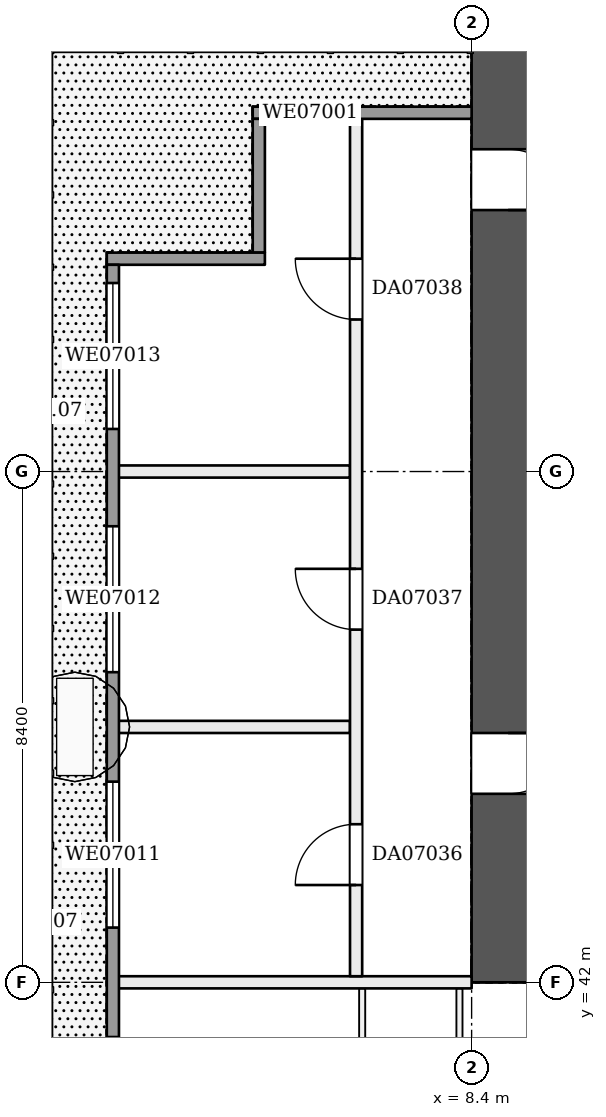
"""IFC4 building model, lengths in metres.
Left out: names, types, materials, properties, quantities, classifications, styles, units other than length and angle.
Written with IfcOpenShell. Run it as: python <this file> out.ifc"""

import sys

from ifc_helpers import new_model, si_unit, direction, frame, frame_2d, origin, place, context, subcontext, project, spatial, rectangle, extrude, element, fill, save


model = new_model("IFC4")
c1 = context("Model", 3, precision=1e-05, world=origin(), true_north=direction((0.0, 1.0)))
c2 = subcontext(c1, "Body", "Model", "MODEL_VIEW")
j1 = project(units=[si_unit("LENGTHUNIT", "METRE"), si_unit("PLANEANGLEUNIT", "RADIAN")], contexts=[c1])
p1 = place(None, origin())
s1 = spatial("IfcSite", under=j1, at=p1, CompositionType="ELEMENT")
p2 = place(p1, origin())
s2 = spatial("IfcBuilding", under=s1, at=p2, CompositionType="ELEMENT")
p3 = place(p2, frame((0.0, 0.0, 35.7)))
s3 = spatial("IfcBuildingStorey", under=s2, at=p3, CompositionType="ELEMENT", Elevation=35.7)
p4 = place(p3, frame((9.0, 58.8, 0.0), z_axis=(0.0, 0.0, 1.0), x_axis=(0.0, -1.0, 0.0)))
e1 = element("IfcWall", 1, at=p4, inside=s3, PredefinedType="SHEAR", context=c2, shape_type="SweptSolid", body=[
    extrude(rectangle(XDim=16.8, YDim=1.2, at=frame_2d((8.4, 0.0))), origin(), (0.0, 0.0, 1.0), 3.22),
])
p5 = place(p4, frame((3.1, 0.0, 0.0)))
e2 = element("IfcOpeningElement", 2, at=p5, cuts=e1, PredefinedType="OPENING", context=c2, shape_type="SweptSolid", body=[
    extrude(rectangle(XDim=1.0, YDim=2.1, at=frame_2d((0.5, 1.05))), frame((0.0, 0.61, 0.0), z_axis=(0.0, -1.0, 0.0), x_axis=(1.0, 0.0, 0.0)), (0.0, 0.0, 1.0), 1.22),
])
p6 = place(p4, frame((12.7, 0.0, 0.0)))
e3 = element("IfcOpeningElement", 3, at=p6, cuts=e1, PredefinedType="OPENING", context=c2, shape_type="SweptSolid", body=[
    extrude(rectangle(XDim=1.0, YDim=2.1, at=frame_2d((0.5, 1.05))), frame((0.0, 0.61, 0.0), z_axis=(0.0, -1.0, 0.0), x_axis=(1.0, 0.0, 0.0)), (0.0, 0.0, 1.0), 1.22),
])
p7 = place(p3, frame((2.5, 42.0, 0.0), z_axis=(0.0, 0.0, 1.0), x_axis=(1.0, 0.0, 0.0)))
e4 = element("IfcWall", 4, at=p7, inside=s3, PredefinedType="PARTITIONING", context=c2, shape_type="SweptSolid", body=[
    extrude(rectangle(XDim=5.9, YDim=0.2, at=frame_2d((2.95, 0.0))), origin(), (0.0, 0.0, 1.0), 3.22),
])
for number, where, z_axis, x_axis in (
    (5, (2.5, 46.2, 0.0), (0.0, 0.0, 1.0), (1.0, 0.0, 0.0)),
    (6, (2.5, 50.4, 0.0), (0.0, 0.0, 1.0), (1.0, 0.0, 0.0)),
):
    element("IfcWall", number, at=place(p3, frame(where, z_axis=z_axis, x_axis=x_axis)), inside=s3, PredefinedType="PARTITIONING", context=c2, shape_type="SweptSolid", body=[
        extrude(rectangle(XDim=3.9, YDim=0.2, at=frame_2d((1.95, 0.0))), origin(), (0.0, 0.0, 1.0), 3.22),
    ])
p8 = place(p3, frame((6.5, 42.1, 0.0), z_axis=(0.0, 0.0, 1.0), x_axis=(0.0, 1.0, 0.0)))
e7 = element("IfcWall", 7, at=p8, inside=s3, PredefinedType="PARTITIONING", context=c2, shape_type="SweptSolid", body=[
    extrude(rectangle(XDim=14.2, YDim=0.2, at=frame_2d((7.1, 0.0))), origin(), (0.0, 0.0, 1.0), 3.22),
])
p9 = place(p8, frame((1.5, 0.0, 0.0)))
e8 = element("IfcOpeningElement", 8, at=p9, cuts=e7, PredefinedType="OPENING", context=c2, shape_type="SweptSolid", body=[
    extrude(rectangle(XDim=1.0, YDim=2.1, at=frame_2d((0.5, 1.05))), frame((0.0, 0.11, 0.0), z_axis=(0.0, -1.0, 0.0), x_axis=(1.0, 0.0, 0.0)), (0.0, 0.0, 1.0), 0.22),
])
p10 = place(p8, frame((5.7, 0.0, 0.0)))
e9 = element("IfcOpeningElement", 9, at=p10, cuts=e7, PredefinedType="OPENING", context=c2, shape_type="SweptSolid", body=[
    extrude(rectangle(XDim=1.0, YDim=2.1, at=frame_2d((0.5, 1.05))), frame((0.0, 0.11, 0.0), z_axis=(0.0, -1.0, 0.0), x_axis=(1.0, 0.0, 0.0)), (0.0, 0.0, 1.0), 0.22),
])
p11 = place(p8, frame((10.8, 0.0, 0.0)))
e10 = element("IfcOpeningElement", 10, at=p11, cuts=e7, PredefinedType="OPENING", context=c2, shape_type="SweptSolid", body=[
    extrude(rectangle(XDim=1.0, YDim=2.1, at=frame_2d((0.5, 1.05))), frame((0.0, 0.11, 0.0), z_axis=(0.0, -1.0, 0.0), x_axis=(1.0, 0.0, 0.0)), (0.0, 0.0, 1.0), 0.22),
])
p12 = place(p3, frame((6.6, 12.7, 0.0), z_axis=(0.0, 0.0, 1.0), x_axis=(0.0, 1.0, 0.0)))
e11 = element("IfcWall", 11, at=p12, inside=s3, PredefinedType="PARTITIONING", context=c2, shape_type="SweptSolid", body=[
    extrude(rectangle(XDim=29.2, YDim=0.1, at=frame_2d((14.6, 0.0))), origin(), (0.0, 0.0, 1.0), 3.22),
])
p13 = place(p12, frame((1.6, 0.0, 0.0)))
e12 = element("IfcOpeningElement", 12, at=p13, cuts=e11, PredefinedType="OPENING", context=c2, shape_type="SweptSolid", body=[
    extrude(rectangle(XDim=0.9, YDim=2.1, at=frame_2d((0.45, 1.05))), frame((0.0, 0.06, 0.0), z_axis=(0.0, -1.0, 0.0), x_axis=(1.0, 0.0, 0.0)), (0.0, 0.0, 1.0), 0.12),
])
p14 = place(p12, frame((5.7, 0.0, 0.0)))
e13 = element("IfcOpeningElement", 13, at=p14, cuts=e11, PredefinedType="OPENING", context=c2, shape_type="SweptSolid", body=[
    extrude(rectangle(XDim=0.9, YDim=2.1, at=frame_2d((0.45, 1.05))), frame((0.0, 0.06, 0.0), z_axis=(0.0, -1.0, 0.0), x_axis=(1.0, 0.0, 0.0)), (0.0, 0.0, 1.0), 0.12),
])
p15 = place(p12, frame((10.0, 0.0, 0.0)))
e14 = element("IfcOpeningElement", 14, at=p15, cuts=e11, PredefinedType="OPENING", context=c2, shape_type="SweptSolid", body=[
    extrude(rectangle(XDim=0.9, YDim=2.1, at=frame_2d((0.45, 1.05))), frame((0.0, 0.06, 0.0), z_axis=(0.0, -1.0, 0.0), x_axis=(1.0, 0.0, 0.0)), (0.0, 0.0, 1.0), 0.12),
])
p16 = place(p12, frame((16.2, 0.0, 0.0)))
e15 = element("IfcOpeningElement", 15, at=p16, cuts=e11, PredefinedType="OPENING", context=c2, shape_type="SweptSolid", body=[
    extrude(rectangle(XDim=0.9, YDim=2.1, at=frame_2d((0.45, 1.05))), frame((0.0, 0.06, 0.0), z_axis=(0.0, -1.0, 0.0), x_axis=(1.0, 0.0, 0.0)), (0.0, 0.0, 1.0), 0.12),
])
p17 = place(p12, frame((22.5, 0.0, 0.0)))
e16 = element("IfcOpeningElement", 16, at=p17, cuts=e11, PredefinedType="OPENING", context=c2, shape_type="SweptSolid", body=[
    extrude(rectangle(XDim=0.9, YDim=2.1, at=frame_2d((0.45, 1.05))), frame((0.0, 0.06, 0.0), z_axis=(0.0, -1.0, 0.0), x_axis=(1.0, 0.0, 0.0)), (0.0, 0.0, 1.0), 0.12),
])
p18 = place(p12, frame((26.7, 0.0, 0.0)))
e17 = element("IfcOpeningElement", 17, at=p18, cuts=e11, PredefinedType="OPENING", context=c2, shape_type="SweptSolid", body=[
    extrude(rectangle(XDim=0.9, YDim=2.1, at=frame_2d((0.45, 1.05))), frame((0.0, 0.06, 0.0), z_axis=(0.0, -1.0, 0.0), x_axis=(1.0, 0.0, 0.0)), (0.0, 0.0, 1.0), 0.12),
])
p19 = place(p3, frame((8.2, 25.3, 0.0), z_axis=(0.0, 0.0, 1.0), x_axis=(0.0, 1.0, 0.0)))
e18 = element("IfcWall", 18, at=p19, inside=s3, PredefinedType="PARTITIONING", context=c2, shape_type="SweptSolid", body=[
    extrude(rectangle(XDim=16.6, YDim=0.1, at=frame_2d((8.3, 0.0))), origin(), (0.0, 0.0, 1.0), 3.22),
])
p20 = place(p19, frame((9.167, 0.0, 0.0)))
e19 = element("IfcOpeningElement", 19, at=p20, cuts=e18, PredefinedType="OPENING", context=c2, shape_type="SweptSolid", body=[
    extrude(rectangle(XDim=0.9, YDim=2.1, at=frame_2d((0.45, 1.05))), frame((0.0, 0.06, 0.0), z_axis=(0.0, -1.0, 0.0), x_axis=(1.0, 0.0, 0.0)), (0.0, 0.0, 1.0), 0.12),
])
p21 = place(p19, frame((2.5, 0.0, 0.0)))
e20 = element("IfcOpeningElement", 20, at=p21, cuts=e18, PredefinedType="OPENING", context=c2, shape_type="SweptSolid", body=[
    extrude(rectangle(XDim=0.9, YDim=2.1, at=frame_2d((0.45, 1.05))), frame((0.0, 0.06, 0.0), z_axis=(0.0, -1.0, 0.0), x_axis=(1.0, 0.0, 0.0)), (0.0, 0.0, 1.0), 0.12),
])
p22 = place(p19, frame((13.533, 0.0, 0.0)))
e21 = element("IfcOpeningElement", 21, at=p22, cuts=e18, PredefinedType="OPENING", context=c2, shape_type="SweptSolid", body=[
    extrude(rectangle(XDim=0.9, YDim=2.1, at=frame_2d((0.45, 1.05))), frame((0.0, 0.06, 0.0), z_axis=(0.0, -1.0, 0.0), x_axis=(1.0, 0.0, 0.0)), (0.0, 0.0, 1.0), 0.12),
])
p23 = place(p3, frame((8.4, 56.3, 0.0), z_axis=(0.0, 0.0, 1.0), x_axis=(-1.0, 0.0, 0.0)))
e22 = element("IfcWall", 22, at=p23, inside=s3, PredefinedType="SOLIDWALL", context=c2, shape_type="SweptSolid", body=[
    extrude(rectangle(XDim=3.6, YDim=0.2, at=frame_2d((1.8, 0.0))), origin(), (0.0, 0.0, 1.0), 3.22),
])
p24 = place(p23, frame((2.0, 0.0, 0.9)))
e23 = element("IfcOpeningElement", 23, at=p24, cuts=e22, PredefinedType="OPENING", context=c2, shape_type="SweptSolid", body=[
    extrude(rectangle(XDim=1.3, YDim=1.5, at=frame_2d((0.65, 0.75))), frame((0.0, 0.11, 0.0), z_axis=(0.0, -1.0, 0.0), x_axis=(1.0, 0.0, 0.0)), (0.0, 0.0, 1.0), 0.22),
])
p25 = place(p3, frame((4.9, 56.2, 0.0), z_axis=(0.0, 0.0, 1.0), x_axis=(0.0, -1.0, 0.0)))
e24 = element("IfcWall", 24, at=p25, inside=s3, PredefinedType="SOLIDWALL", context=c2, shape_type="SweptSolid", body=[
    extrude(rectangle(XDim=2.2, YDim=0.2, at=frame_2d((1.1, 0.0))), origin(), (0.0, 0.0, 1.0), 3.22),
])
p26 = place(p3, frame((5.0, 53.9, 0.0), z_axis=(0.0, 0.0, 1.0), x_axis=(-1.0, 0.0, 0.0)))
e25 = element("IfcWall", 25, at=p26, inside=s3, PredefinedType="SOLIDWALL", context=c2, shape_type="SweptSolid", body=[
    extrude(rectangle(XDim=2.6, YDim=0.2, at=frame_2d((1.3, 0.0))), origin(), (0.0, 0.0, 1.0), 3.22),
])
p27 = place(p3, frame((2.5, 53.8, 0.0), z_axis=(0.0, 0.0, 1.0), x_axis=(0.0, -1.0, 0.0)))
e26 = element("IfcWall", 26, at=p27, inside=s3, PredefinedType="SOLIDWALL", context=c2, shape_type="SweptSolid", body=[
    extrude(rectangle(XDim=48.8, YDim=0.2, at=frame_2d((24.4, 0.0))), origin(), (0.0, 0.0, 1.0), 3.22),
])
p28 = place(p27, frame((46.1, 0.0, 0.0)))
e27 = element("IfcOpeningElement", 27, at=p28, cuts=e26, PredefinedType="OPENING", context=c2, shape_type="SweptSolid", body=[
    extrude(rectangle(XDim=2.4, YDim=2.2, at=frame_2d((1.2, 1.1))), frame((0.0, 0.11, 0.0), z_axis=(0.0, -1.0, 0.0), x_axis=(1.0, 0.0, 0.0)), (0.0, 0.0, 1.0), 0.22),
])
p29 = place(p27, frame((42.1, 0.0, 0.0)))
e28 = element("IfcOpeningElement", 28, at=p29, cuts=e26, PredefinedType="OPENING", context=c2, shape_type="SweptSolid", body=[
    extrude(rectangle(XDim=2.4, YDim=2.2, at=frame_2d((1.2, 1.1))), frame((0.0, 0.11, 0.0), z_axis=(0.0, -1.0, 0.0), x_axis=(1.0, 0.0, 0.0)), (0.0, 0.0, 1.0), 0.22),
])
p30 = place(p27, frame((37.9, 0.0, 0.0)))
e29 = element("IfcOpeningElement", 29, at=p30, cuts=e26, PredefinedType="OPENING", context=c2, shape_type="SweptSolid", body=[
    extrude(rectangle(XDim=2.4, YDim=2.2, at=frame_2d((1.2, 1.1))), frame((0.0, 0.11, 0.0), z_axis=(0.0, -1.0, 0.0), x_axis=(1.0, 0.0, 0.0)), (0.0, 0.0, 1.0), 0.22),
])
p31 = place(p27, frame((33.7, 0.0, 0.9)))
e30 = element("IfcOpeningElement", 30, at=p31, cuts=e26, PredefinedType="OPENING", context=c2, shape_type="SweptSolid", body=[
    extrude(rectangle(XDim=2.4, YDim=1.5, at=frame_2d((1.2, 0.75))), frame((0.0, 0.11, 0.0), z_axis=(0.0, -1.0, 0.0), x_axis=(1.0, 0.0, 0.0)), (0.0, 0.0, 1.0), 0.22),
])
p32 = place(p27, frame((29.5, 0.0, 0.9)))
e31 = element("IfcOpeningElement", 31, at=p32, cuts=e26, PredefinedType="OPENING", context=c2, shape_type="SweptSolid", body=[
    extrude(rectangle(XDim=2.4, YDim=1.5, at=frame_2d((1.2, 0.75))), frame((0.0, 0.11, 0.0), z_axis=(0.0, -1.0, 0.0), x_axis=(1.0, 0.0, 0.0)), (0.0, 0.0, 1.0), 0.22),
])
p33 = place(p27, frame((25.3, 0.0, 0.0)))
e32 = element("IfcOpeningElement", 32, at=p33, cuts=e26, PredefinedType="OPENING", context=c2, shape_type="SweptSolid", body=[
    extrude(rectangle(XDim=2.4, YDim=2.2, at=frame_2d((1.2, 1.1))), frame((0.0, 0.11, 0.0), z_axis=(0.0, -1.0, 0.0), x_axis=(1.0, 0.0, 0.0)), (0.0, 0.0, 1.0), 0.22),
])
p34 = place(p27, frame((21.1, 0.0, 0.0)))
e33 = element("IfcOpeningElement", 33, at=p34, cuts=e26, PredefinedType="OPENING", context=c2, shape_type="SweptSolid", body=[
    extrude(rectangle(XDim=2.4, YDim=2.2, at=frame_2d((1.2, 1.1))), frame((0.0, 0.11, 0.0), z_axis=(0.0, -1.0, 0.0), x_axis=(1.0, 0.0, 0.0)), (0.0, 0.0, 1.0), 0.22),
])
p35 = place(p27, frame((16.9, 0.0, 0.9)))
e34 = element("IfcOpeningElement", 34, at=p35, cuts=e26, PredefinedType="OPENING", context=c2, shape_type="SweptSolid", body=[
    extrude(rectangle(XDim=2.4, YDim=1.5, at=frame_2d((1.2, 0.75))), frame((0.0, 0.11, 0.0), z_axis=(0.0, -1.0, 0.0), x_axis=(1.0, 0.0, 0.0)), (0.0, 0.0, 1.0), 0.22),
])
p36 = place(p27, frame((12.7, 0.0, 0.9)))
e35 = element("IfcOpeningElement", 35, at=p36, cuts=e26, PredefinedType="OPENING", context=c2, shape_type="SweptSolid", body=[
    extrude(rectangle(XDim=2.4, YDim=1.5, at=frame_2d((1.2, 0.75))), frame((0.0, 0.11, 0.0), z_axis=(0.0, -1.0, 0.0), x_axis=(1.0, 0.0, 0.0)), (0.0, 0.0, 1.0), 0.22),
])
p37 = place(p27, frame((8.5, 0.0, 0.9)))
e36 = element("IfcOpeningElement", 36, at=p37, cuts=e26, PredefinedType="OPENING", context=c2, shape_type="SweptSolid", body=[
    extrude(rectangle(XDim=2.4, YDim=1.5, at=frame_2d((1.2, 0.75))), frame((0.0, 0.11, 0.0), z_axis=(0.0, -1.0, 0.0), x_axis=(1.0, 0.0, 0.0)), (0.0, 0.0, 1.0), 0.22),
])
p38 = place(p27, frame((4.3, 0.0, 0.9)))
e37 = element("IfcOpeningElement", 37, at=p38, cuts=e26, PredefinedType="OPENING", context=c2, shape_type="SweptSolid", body=[
    extrude(rectangle(XDim=2.4, YDim=1.5, at=frame_2d((1.2, 0.75))), frame((0.0, 0.11, 0.0), z_axis=(0.0, -1.0, 0.0), x_axis=(1.0, 0.0, 0.0)), (0.0, 0.0, 1.0), 0.22),
])
p39 = place(p27, frame((0.3, 0.0, 0.9)))
e38 = element("IfcOpeningElement", 38, at=p39, cuts=e26, PredefinedType="OPENING", context=c2, shape_type="SweptSolid", body=[
    extrude(rectangle(XDim=2.4, YDim=1.5, at=frame_2d((1.2, 0.75))), frame((0.0, 0.11, 0.0), z_axis=(0.0, -1.0, 0.0), x_axis=(1.0, 0.0, 0.0)), (0.0, 0.0, 1.0), 0.22),
])
p40 = place(p5, origin())
e39 = element("IfcDoor", 39, at=p40, inside=s3, OperationType="SINGLE_SWING_RIGHT", PredefinedType="DOOR", context=c2, shape_type="SweptSolid", body=[
    extrude(rectangle(XDim=1.0, YDim=2.1, at=frame_2d((0.5, 1.05))), frame((0.0, 0.025, 0.0), z_axis=(0.0, -1.0, 0.0), x_axis=(1.0, 0.0, 0.0)), (0.0, 0.0, 1.0), 0.05),
])
fill(e2, e39)
p41 = place(p6, origin())
e40 = element("IfcDoor", 40, at=p41, inside=s3, OperationType="SINGLE_SWING_LEFT", PredefinedType="DOOR", context=c2, shape_type="SweptSolid", body=[
    extrude(rectangle(XDim=1.0, YDim=2.1, at=frame_2d((0.5, 1.05))), frame((0.0, 0.025, 0.0), z_axis=(0.0, -1.0, 0.0), x_axis=(1.0, 0.0, 0.0)), (0.0, 0.0, 1.0), 0.05),
])
fill(e3, e40)
p42 = place(p9, origin())
e41 = element("IfcDoor", 41, at=p42, inside=s3, OperationType="SINGLE_SWING_LEFT", PredefinedType="DOOR", context=c2, shape_type="SweptSolid", body=[
    extrude(rectangle(XDim=1.0, YDim=2.1, at=frame_2d((0.5, 1.05))), frame((0.0, 0.025, 0.0), z_axis=(0.0, -1.0, 0.0), x_axis=(1.0, 0.0, 0.0)), (0.0, 0.0, 1.0), 0.05),
])
fill(e8, e41)
p43 = place(p10, origin())
e42 = element("IfcDoor", 42, at=p43, inside=s3, OperationType="SINGLE_SWING_RIGHT", PredefinedType="DOOR", context=c2, shape_type="SweptSolid", body=[
    extrude(rectangle(XDim=1.0, YDim=2.1, at=frame_2d((0.5, 1.05))), frame((0.0, 0.025, 0.0), z_axis=(0.0, -1.0, 0.0), x_axis=(1.0, 0.0, 0.0)), (0.0, 0.0, 1.0), 0.05),
])
fill(e9, e42)
p44 = place(p11, origin())
e43 = element("IfcDoor", 43, at=p44, inside=s3, OperationType="SINGLE_SWING_RIGHT", PredefinedType="DOOR", context=c2, shape_type="SweptSolid", body=[
    extrude(rectangle(XDim=1.0, YDim=2.1, at=frame_2d((0.5, 1.05))), frame((0.0, 0.025, 0.0), z_axis=(0.0, -1.0, 0.0), x_axis=(1.0, 0.0, 0.0)), (0.0, 0.0, 1.0), 0.05),
])
fill(e10, e43)
p45 = place(p24, origin())
e44 = element("IfcWindow", 44, at=p45, inside=s3, PartitioningType="SINGLE_PANEL", PredefinedType="WINDOW", context=c2, shape_type="SweptSolid", body=[
    extrude(rectangle(XDim=1.3, YDim=1.5, at=frame_2d((0.65, 0.75))), frame((0.0, 0.03, 0.0), z_axis=(0.0, -1.0, 0.0), x_axis=(1.0, 0.0, 0.0)), (0.0, 0.0, 1.0), 0.06),
])
fill(e23, e44)
p46 = place(p37, origin())
e45 = element("IfcWindow", 45, at=p46, inside=s3, PartitioningType="SINGLE_PANEL", PredefinedType="WINDOW", context=c2, shape_type="SweptSolid", body=[
    extrude(rectangle(XDim=2.4, YDim=1.5, at=frame_2d((1.2, 0.75))), frame((0.0, 0.03, 0.0), z_axis=(0.0, -1.0, 0.0), x_axis=(1.0, 0.0, 0.0)), (0.0, 0.0, 1.0), 0.06),
])
fill(e36, e45)
p47 = place(p38, origin())
e46 = element("IfcWindow", 46, at=p47, inside=s3, PartitioningType="SINGLE_PANEL", PredefinedType="WINDOW", context=c2, shape_type="SweptSolid", body=[
    extrude(rectangle(XDim=2.4, YDim=1.5, at=frame_2d((1.2, 0.75))), frame((0.0, 0.03, 0.0), z_axis=(0.0, -1.0, 0.0), x_axis=(1.0, 0.0, 0.0)), (0.0, 0.0, 1.0), 0.06),
])
fill(e37, e46)
p48 = place(p39, origin())
e47 = element("IfcWindow", 47, at=p48, inside=s3, PartitioningType="SINGLE_PANEL", PredefinedType="WINDOW", context=c2, shape_type="SweptSolid", body=[
    extrude(rectangle(XDim=2.4, YDim=1.5, at=frame_2d((1.2, 0.75))), frame((0.0, 0.03, 0.0), z_axis=(0.0, -1.0, 0.0), x_axis=(1.0, 0.0, 0.0)), (0.0, 0.0, 1.0), 0.06),
])
fill(e38, e47)
save(model, sys.argv[1])
